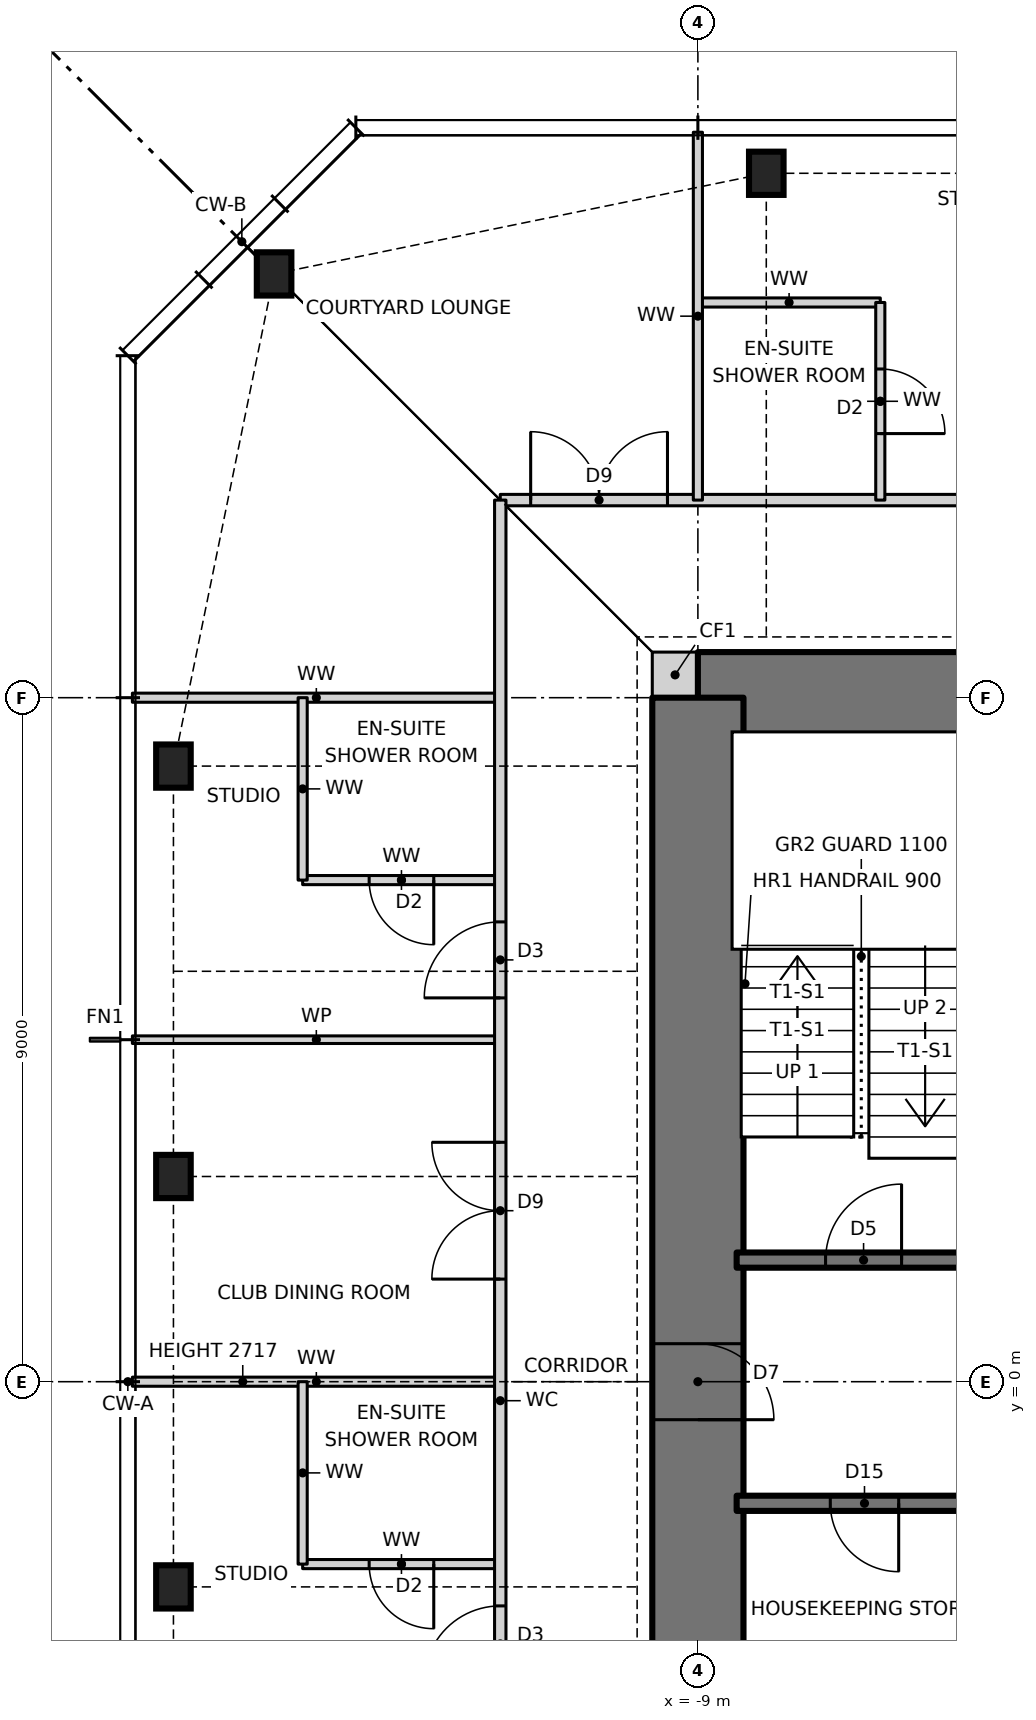
"""IFC4 building model, lengths in metres.
Left out: names, types, materials, properties, quantities, classifications, styles, units other than length and angle.
Written with IfcOpenShell. Run it as: python <this file> out.ifc"""

import sys

from ifc_helpers import new_model, si_unit, direction, frame, frame_2d, origin, origin_2d, place, context, subcontext, project, spatial, rectangle, i_section, extrude, element, fill, save


model = new_model("IFC4")
c1 = context("Model", 3, precision=1e-05, world=origin(), true_north=direction((0.0, 1.0)))
c2 = subcontext(c1, "Body", "Model", "MODEL_VIEW")
j1 = project(units=[si_unit("LENGTHUNIT", "METRE"), si_unit("PLANEANGLEUNIT", "RADIAN")], contexts=[c1])
p1 = place(None, origin())
s1 = spatial("IfcSite", under=j1, at=p1, CompositionType="ELEMENT")
p2 = place(p1, origin())
s2 = spatial("IfcBuilding", under=s1, at=p2, CompositionType="ELEMENT")
p3 = place(p2, frame((0.0, 0.0, 264.0)))
s3 = spatial("IfcBuildingStorey", under=s2, at=p3, CompositionType="ELEMENT", Elevation=264.0)
for number, where, z_axis, x_axis in (
    (1, (-8.1, 15.9, 0.0), (0.0, 0.0, 1.0), (1.0, 0.0, 0.0)),
    (2, (-14.576, 14.576, 0.0), (0.0, 0.0, 1.0), (1.0, 0.0, 0.0)),
    (3, (-15.9, 8.1, 0.0), (0.0, 0.0, 1.0), (1.0, 0.0, 0.0)),
    (4, (-15.9, 2.7, 0.0), (0.0, 0.0, 1.0), (1.0, 0.0, 0.0)),
    (5, (-15.9, -2.7, 0.0), (0.0, 0.0, 1.0), (1.0, 0.0, 0.0)),
):
    element("IfcColumn", number, at=place(p3, frame(where, z_axis=z_axis, x_axis=x_axis)), inside=s3, PredefinedType="COLUMN", context=c2, shape_type="SweptSolid", body=[
        extrude(i_section(OverallWidth=0.455, OverallDepth=0.569, WebThickness=0.078, FlangeThickness=0.125, at=origin_2d()), origin(), (0.0, 0.0, 1.0), 3.5),
    ])
p4 = place(p3, frame((-9.6, 9.3, 0.0), z_axis=(0.0, 0.0, 1.0), x_axis=(1.0, 0.0, 0.0)))
e6 = element("IfcWall", 6, at=p4, inside=s3, PredefinedType="SOLIDWALL", context=c2, shape_type="SweptSolid", body=[
    extrude(rectangle(XDim=0.6, YDim=0.6, at=frame_2d((0.3, 0.0))), origin(), (0.0, 0.0, 1.0), 3.5),
])
p5 = place(p3, frame((9.0, 9.0, 0.0), z_axis=(0.0, 0.0, 1.0), x_axis=(-1.0, 0.0, 0.0)))
e7 = element("IfcWall", 7, at=p5, inside=s3, PredefinedType="SHEAR", context=c2, shape_type="SweptSolid", body=[
    extrude(rectangle(XDim=18.0, YDim=1.2, at=frame_2d((9.0, 0.0))), origin(), (0.0, 0.0, 1.0), 3.5),
])
p6 = place(p5, frame((11.125, 0.0, 0.0)))
e8 = element("IfcOpeningElement", 8, at=p6, cuts=e7, PredefinedType="OPENING", context=c2, shape_type="SweptSolid", body=[
    extrude(rectangle(XDim=0.9, YDim=2.1, at=frame_2d((0.45, 1.05))), frame((0.0, 0.61, 0.0), z_axis=(0.0, -1.0, 0.0), x_axis=(1.0, 0.0, 0.0)), (0.0, 0.0, 1.0), 1.22),
])
p7 = place(p5, frame((4.275, 0.0, 0.0)))
e9 = element("IfcOpeningElement", 9, at=p7, cuts=e7, PredefinedType="OPENING", context=c2, shape_type="SweptSolid", body=[
    extrude(rectangle(XDim=0.9, YDim=2.1, at=frame_2d((0.45, 1.05))), frame((0.0, 0.61, 0.0), z_axis=(0.0, -1.0, 0.0), x_axis=(1.0, 0.0, 0.0)), (0.0, 0.0, 1.0), 1.22),
])
p8 = place(p3, frame((-9.0, 9.0, 0.0), z_axis=(0.0, 0.0, 1.0), x_axis=(0.0, -1.0, 0.0)))
e10 = element("IfcWall", 10, at=p8, inside=s3, PredefinedType="SHEAR", context=c2, shape_type="SweptSolid", body=[
    extrude(rectangle(XDim=18.0, YDim=1.2, at=frame_2d((9.0, 0.0))), origin(), (0.0, 0.0, 1.0), 3.5),
])
p9 = place(p8, frame((8.5, 0.0, 0.0)))
e11 = element("IfcOpeningElement", 11, at=p9, cuts=e10, PredefinedType="OPENING", context=c2, shape_type="SweptSolid", body=[
    extrude(rectangle(XDim=1.0, YDim=2.1, at=frame_2d((0.5, 1.05))), frame((0.0, 0.61, 0.0), z_axis=(0.0, -1.0, 0.0), x_axis=(1.0, 0.0, 0.0)), (0.0, 0.0, 1.0), 1.22),
])
p10 = place(p3, frame((-14.2, -2.4, 0.0), z_axis=(0.0, 0.0, 1.0), x_axis=(1.0, 0.0, 0.0)))
e12 = element("IfcWall", 12, at=p10, inside=s3, PredefinedType="PARTITIONING", context=c2, shape_type="SweptSolid", body=[
    extrude(rectangle(XDim=2.6, YDim=0.12, at=frame_2d((1.3, 0.0))), origin(), (0.0, 0.0, 1.0), 3.25),
])
p11 = place(p10, frame((0.875, 0.0, 0.0)))
e13 = element("IfcOpeningElement", 13, at=p11, cuts=e12, PredefinedType="OPENING", context=c2, shape_type="SweptSolid", body=[
    extrude(rectangle(XDim=0.85, YDim=2.1, at=frame_2d((0.425, 1.05))), frame((0.0, 0.07, 0.0), z_axis=(0.0, -1.0, 0.0), x_axis=(1.0, 0.0, 0.0)), (0.0, 0.0, 1.0), 0.14),
])
p12 = place(p3, frame((-8.49, -1.6, 0.0), z_axis=(0.0, 0.0, 1.0), x_axis=(1.0, 0.0, 0.0)))
e14 = element("IfcWall", 14, at=p12, inside=s3, PredefinedType="SOLIDWALL", context=c2, shape_type="SweptSolid", body=[
    extrude(rectangle(XDim=16.98, YDim=0.2, at=frame_2d((8.49, 0.0))), origin(), (0.0, 0.0, 1.0), 3.5),
])
p13 = place(p12, frame((14.81, 0.0, 0.0)))
e15 = element("IfcOpeningElement", 15, at=p13, cuts=e14, PredefinedType="OPENING", context=c2, shape_type="SweptSolid", body=[
    extrude(rectangle(XDim=1.0, YDim=2.1, at=frame_2d((0.5, 1.05))), frame((0.0, 0.11, 0.0), z_axis=(0.0, -1.0, 0.0), x_axis=(1.0, 0.0, 0.0)), (0.0, 0.0, 1.0), 0.22),
])
p14 = place(p12, frame((1.232, 0.0, 0.0)))
e16 = element("IfcOpeningElement", 16, at=p14, cuts=e14, PredefinedType="OPENING", context=c2, shape_type="SweptSolid", body=[
    extrude(rectangle(XDim=0.9, YDim=2.1, at=frame_2d((0.45, 1.05))), frame((0.0, 0.11, 0.0), z_axis=(0.0, -1.0, 0.0), x_axis=(1.0, 0.0, 0.0)), (0.0, 0.0, 1.0), 0.22),
])
p15 = place(p12, frame((4.627, 0.0, 0.0)))
e17 = element("IfcOpeningElement", 17, at=p15, cuts=e14, PredefinedType="OPENING", context=c2, shape_type="SweptSolid", body=[
    extrude(rectangle(XDim=0.9, YDim=2.1, at=frame_2d((0.45, 1.05))), frame((0.0, 0.11, 0.0), z_axis=(0.0, -1.0, 0.0), x_axis=(1.0, 0.0, 0.0)), (0.0, 0.0, 1.0), 0.22),
])
p16 = place(p12, frame((8.052, 0.0, 0.0)))
e18 = element("IfcOpeningElement", 18, at=p16, cuts=e14, PredefinedType="OPENING", context=c2, shape_type="SweptSolid", body=[
    extrude(rectangle(XDim=0.9, YDim=2.1, at=frame_2d((0.45, 1.05))), frame((0.0, 0.11, 0.0), z_axis=(0.0, -1.0, 0.0), x_axis=(1.0, 0.0, 0.0)), (0.0, 0.0, 1.0), 0.22),
])
p17 = place(p12, frame((11.478, 0.0, 0.0)))
e19 = element("IfcOpeningElement", 19, at=p17, cuts=e14, PredefinedType="OPENING", context=c2, shape_type="SweptSolid", body=[
    extrude(rectangle(XDim=0.9, YDim=2.1, at=frame_2d((0.45, 1.05))), frame((0.0, 0.11, 0.0), z_axis=(0.0, -1.0, 0.0), x_axis=(1.0, 0.0, 0.0)), (0.0, 0.0, 1.0), 0.22),
])
p18 = place(p3, frame((-16.44, 0.0, 0.0), z_axis=(0.0, 0.0, 1.0), x_axis=(1.0, 0.0, 0.0)))
e20 = element("IfcWall", 20, at=p18, inside=s3, PredefinedType="PARTITIONING", context=c2, shape_type="SweptSolid", body=[
    extrude(rectangle(XDim=4.84, YDim=0.12, at=frame_2d((2.42, 0.0))), origin(), (0.0, 0.0, 1.0), 2.717),
])
p19 = place(p3, frame((-8.49, 1.6, 0.0), z_axis=(0.0, 0.0, 1.0), x_axis=(1.0, 0.0, 0.0)))
e21 = element("IfcWall", 21, at=p19, inside=s3, PredefinedType="SOLIDWALL", context=c2, shape_type="SweptSolid", body=[
    extrude(rectangle(XDim=16.98, YDim=0.2, at=frame_2d((8.49, 0.0))), origin(), (0.0, 0.0, 1.0), 3.5),
])
p20 = place(p19, frame((1.17, 0.0, 0.0)))
e22 = element("IfcOpeningElement", 22, at=p20, cuts=e21, PredefinedType="OPENING", context=c2, shape_type="SweptSolid", body=[
    extrude(rectangle(XDim=1.0, YDim=2.1, at=frame_2d((0.5, 1.05))), frame((0.0, 0.11, 0.0), z_axis=(0.0, -1.0, 0.0), x_axis=(1.0, 0.0, 0.0)), (0.0, 0.0, 1.0), 0.22),
])
p21 = place(p19, frame((4.606, 0.0, 0.0)))
e23 = element("IfcOpeningElement", 23, at=p21, cuts=e21, PredefinedType="OPENING", context=c2, shape_type="SweptSolid", body=[
    extrude(rectangle(XDim=0.9, YDim=2.1, at=frame_2d((0.45, 1.05))), frame((0.0, 0.11, 0.0), z_axis=(0.0, -1.0, 0.0), x_axis=(1.0, 0.0, 0.0)), (0.0, 0.0, 1.0), 0.22),
])
p22 = place(p19, frame((8.04, 0.0, 0.0)))
e24 = element("IfcOpeningElement", 24, at=p22, cuts=e21, PredefinedType="OPENING", context=c2, shape_type="SweptSolid", body=[
    extrude(rectangle(XDim=0.9, YDim=2.1, at=frame_2d((0.45, 1.05))), frame((0.0, 0.11, 0.0), z_axis=(0.0, -1.0, 0.0), x_axis=(1.0, 0.0, 0.0)), (0.0, 0.0, 1.0), 0.22),
])
p23 = place(p19, frame((11.374, 0.0, 0.0)))
e25 = element("IfcOpeningElement", 25, at=p23, cuts=e21, PredefinedType="OPENING", context=c2, shape_type="SweptSolid", body=[
    extrude(rectangle(XDim=1.1, YDim=2.1, at=frame_2d((0.55, 1.05))), frame((0.0, 0.11, 0.0), z_axis=(0.0, -1.0, 0.0), x_axis=(1.0, 0.0, 0.0)), (0.0, 0.0, 1.0), 0.22),
])
p24 = place(p19, frame((14.66, 0.0, 0.0)))
e26 = element("IfcOpeningElement", 26, at=p24, cuts=e21, PredefinedType="OPENING", context=c2, shape_type="SweptSolid", body=[
    extrude(rectangle(XDim=1.3, YDim=2.1, at=frame_2d((0.65, 1.05))), frame((0.0, 0.11, 0.0), z_axis=(0.0, -1.0, 0.0), x_axis=(1.0, 0.0, 0.0)), (0.0, 0.0, 1.0), 0.22),
])
p25 = place(p3, frame((-16.44, 4.5, 0.0), z_axis=(0.0, 0.0, 1.0), x_axis=(1.0, 0.0, 0.0)))
e27 = element("IfcWall", 27, at=p25, inside=s3, PredefinedType="PARTITIONING", context=c2, shape_type="SweptSolid", body=[
    extrude(rectangle(XDim=4.84, YDim=0.1, at=frame_2d((2.42, 0.0))), origin(), (0.0, 0.0, 1.0), 3.25),
])
p26 = place(p3, frame((-14.2, 6.6, 0.0), z_axis=(0.0, 0.0, 1.0), x_axis=(1.0, 0.0, 0.0)))
e28 = element("IfcWall", 28, at=p26, inside=s3, PredefinedType="PARTITIONING", context=c2, shape_type="SweptSolid", body=[
    extrude(rectangle(XDim=2.6, YDim=0.12, at=frame_2d((1.3, 0.0))), origin(), (0.0, 0.0, 1.0), 3.25),
])
p27 = place(p26, frame((0.875, 0.0, 0.0)))
e29 = element("IfcOpeningElement", 29, at=p27, cuts=e28, PredefinedType="OPENING", context=c2, shape_type="SweptSolid", body=[
    extrude(rectangle(XDim=0.85, YDim=2.1, at=frame_2d((0.425, 1.05))), frame((0.0, 0.07, 0.0), z_axis=(0.0, -1.0, 0.0), x_axis=(1.0, 0.0, 0.0)), (0.0, 0.0, 1.0), 0.14),
])
p28 = place(p3, frame((-16.44, 9.0, 0.0), z_axis=(0.0, 0.0, 1.0), x_axis=(1.0, 0.0, 0.0)))
e30 = element("IfcWall", 30, at=p28, inside=s3, PredefinedType="PARTITIONING", context=c2, shape_type="SweptSolid", body=[
    extrude(rectangle(XDim=4.84, YDim=0.12, at=frame_2d((2.42, 0.0))), origin(), (0.0, 0.0, 1.0), 3.25),
])
p29 = place(p3, frame((-11.6, 11.6, 0.0), z_axis=(0.0, 0.0, 1.0), x_axis=(1.0, 0.0, 0.0)))
e31 = element("IfcWall", 31, at=p29, inside=s3, PredefinedType="PARTITIONING", context=c2, shape_type="SweptSolid", body=[
    extrude(rectangle(XDim=23.2, YDim=0.15, at=frame_2d((11.6, 0.0))), origin(), (0.0, 0.0, 1.0), 3.25),
])
p30 = place(p29, frame((15.2, 0.0, 0.0)))
e32 = element("IfcOpeningElement", 32, at=p30, cuts=e31, PredefinedType="OPENING", context=c2, shape_type="SweptSolid", body=[
    extrude(rectangle(XDim=1.8, YDim=2.1, at=frame_2d((0.9, 1.05))), frame((0.0, 0.085, 0.0), z_axis=(0.0, -1.0, 0.0), x_axis=(1.0, 0.0, 0.0)), (0.0, 0.0, 1.0), 0.17),
])
p31 = place(p29, frame((8.85, 0.0, 0.0)))
e33 = element("IfcOpeningElement", 33, at=p31, cuts=e31, PredefinedType="OPENING", context=c2, shape_type="SweptSolid", body=[
    extrude(rectangle(XDim=1.0, YDim=2.1, at=frame_2d((0.5, 1.05))), frame((0.0, 0.085, 0.0), z_axis=(0.0, -1.0, 0.0), x_axis=(1.0, 0.0, 0.0)), (0.0, 0.0, 1.0), 0.17),
])
p32 = place(p29, frame((0.4, 0.0, 0.0)))
e34 = element("IfcOpeningElement", 34, at=p32, cuts=e31, PredefinedType="OPENING", context=c2, shape_type="SweptSolid", body=[
    extrude(rectangle(XDim=1.8, YDim=2.1, at=frame_2d((0.9, 1.05))), frame((0.0, 0.085, 0.0), z_axis=(0.0, -1.0, 0.0), x_axis=(1.0, 0.0, 0.0)), (0.0, 0.0, 1.0), 0.17),
])
p33 = place(p3, frame((-9.0, 14.2, 0.0), z_axis=(0.0, 0.0, 1.0), x_axis=(1.0, 0.0, 0.0)))
e35 = element("IfcWall", 35, at=p33, inside=s3, PredefinedType="PARTITIONING", context=c2, shape_type="SweptSolid", body=[
    extrude(rectangle(XDim=2.4, YDim=0.12, at=frame_2d((1.2, 0.0))), origin(), (0.0, 0.0, 1.0), 3.25),
])
p34 = place(p3, frame((-6.6, 11.6, 0.0), z_axis=(0.0, 0.0, 1.0), x_axis=(0.0, 1.0, 0.0)))
e36 = element("IfcWall", 36, at=p34, inside=s3, PredefinedType="PARTITIONING", context=c2, shape_type="SweptSolid", body=[
    extrude(rectangle(XDim=2.6, YDim=0.12, at=frame_2d((1.3, 0.0))), origin(), (0.0, 0.0, 1.0), 3.25),
])
p35 = place(p34, frame((0.875, 0.0, 0.0)))
e37 = element("IfcOpeningElement", 37, at=p35, cuts=e36, PredefinedType="OPENING", context=c2, shape_type="SweptSolid", body=[
    extrude(rectangle(XDim=0.85, YDim=2.1, at=frame_2d((0.425, 1.05))), frame((0.0, 0.07, 0.0), z_axis=(0.0, -1.0, 0.0), x_axis=(1.0, 0.0, 0.0)), (0.0, 0.0, 1.0), 0.14),
])
p36 = place(p3, frame((-9.0, 11.6, 0.0), z_axis=(0.0, 0.0, 1.0), x_axis=(0.0, 1.0, 0.0)))
e38 = element("IfcWall", 38, at=p36, inside=s3, PredefinedType="PARTITIONING", context=c2, shape_type="SweptSolid", body=[
    extrude(rectangle(XDim=4.84, YDim=0.12, at=frame_2d((2.42, 0.0))), origin(), (0.0, 0.0, 1.0), 3.25),
])
p37 = place(p3, frame((-11.6, -12.1, 0.0), z_axis=(0.0, 0.0, 1.0), x_axis=(0.0, 1.0, 0.0)))
e39 = element("IfcWall", 39, at=p37, inside=s3, PredefinedType="PARTITIONING", context=c2, shape_type="SweptSolid", body=[
    extrude(rectangle(XDim=23.7, YDim=0.15, at=frame_2d((11.85, 0.0))), origin(), (0.0, 0.0, 1.0), 3.25),
])
p38 = place(p37, frame((17.15, 0.0, 0.0)))
e40 = element("IfcOpeningElement", 40, at=p38, cuts=e39, PredefinedType="OPENING", context=c2, shape_type="SweptSolid", body=[
    extrude(rectangle(XDim=1.0, YDim=2.1, at=frame_2d((0.5, 1.05))), frame((0.0, 0.085, 0.0), z_axis=(0.0, -1.0, 0.0), x_axis=(1.0, 0.0, 0.0)), (0.0, 0.0, 1.0), 0.17),
])
p39 = place(p37, frame((13.45, 0.0, 0.0)))
e41 = element("IfcOpeningElement", 41, at=p39, cuts=e39, PredefinedType="OPENING", context=c2, shape_type="SweptSolid", body=[
    extrude(rectangle(XDim=1.8, YDim=2.1, at=frame_2d((0.9, 1.05))), frame((0.0, 0.085, 0.0), z_axis=(0.0, -1.0, 0.0), x_axis=(1.0, 0.0, 0.0)), (0.0, 0.0, 1.0), 0.17),
])
p40 = place(p37, frame((8.15, 0.0, 0.0)))
e42 = element("IfcOpeningElement", 42, at=p40, cuts=e39, PredefinedType="OPENING", context=c2, shape_type="SweptSolid", body=[
    extrude(rectangle(XDim=1.0, YDim=2.1, at=frame_2d((0.5, 1.05))), frame((0.0, 0.085, 0.0), z_axis=(0.0, -1.0, 0.0), x_axis=(1.0, 0.0, 0.0)), (0.0, 0.0, 1.0), 0.17),
])
p41 = place(p37, frame((6.05, 0.0, 0.0)))
e43 = element("IfcOpeningElement", 43, at=p41, cuts=e39, PredefinedType="OPENING", context=c2, shape_type="SweptSolid", body=[
    extrude(rectangle(XDim=1.0, YDim=2.1, at=frame_2d((0.5, 1.05))), frame((0.0, 0.085, 0.0), z_axis=(0.0, -1.0, 0.0), x_axis=(1.0, 0.0, 0.0)), (0.0, 0.0, 1.0), 0.17),
])
p42 = place(p37, frame((0.65, 0.0, 0.0)))
e44 = element("IfcOpeningElement", 44, at=p42, cuts=e39, PredefinedType="OPENING", context=c2, shape_type="SweptSolid", body=[
    extrude(rectangle(XDim=1.8, YDim=2.1, at=frame_2d((0.9, 1.05))), frame((0.0, 0.085, 0.0), z_axis=(0.0, -1.0, 0.0), x_axis=(1.0, 0.0, 0.0)), (0.0, 0.0, 1.0), 0.17),
])
for number, where, z_axis, x_axis in (
    (45, (-14.2, -2.4, 0.0), (0.0, 0.0, 1.0), (0.0, 1.0, 0.0)),
    (46, (-14.2, 6.6, 0.0), (0.0, 0.0, 1.0), (0.0, 1.0, 0.0)),
):
    element("IfcWall", number, at=place(p3, frame(where, z_axis=z_axis, x_axis=x_axis)), inside=s3, PredefinedType="PARTITIONING", context=c2, shape_type="SweptSolid", body=[
        extrude(rectangle(XDim=2.4, YDim=0.12, at=frame_2d((1.2, 0.0))), origin(), (0.0, 0.0, 1.0), 3.25),
    ])
p43 = place(p20, origin())
e47 = element("IfcDoor", 47, at=p43, inside=s3, OperationType="SINGLE_SWING_RIGHT", PredefinedType="DOOR", context=c2, shape_type="SweptSolid", body=[
    extrude(rectangle(XDim=1.0, YDim=2.1, at=frame_2d((0.5, 1.05))), frame((0.0, 0.025, 0.0), z_axis=(0.0, -1.0, 0.0), x_axis=(1.0, 0.0, 0.0)), (0.0, 0.0, 1.0), 0.05),
])
fill(e22, e47)
p44 = place(p14, frame((0.9, 0.0, 0.0), z_axis=(0.0, 0.0, 1.0), x_axis=(-1.0, 0.0, 0.0)))
e48 = element("IfcDoor", 48, at=p44, inside=s3, OperationType="SINGLE_SWING_LEFT", PredefinedType="DOOR", context=c2, shape_type="SweptSolid", body=[
    extrude(rectangle(XDim=0.9, YDim=2.1, at=frame_2d((0.45, 1.05))), frame((0.0, 0.025, 0.0), z_axis=(0.0, -1.0, 0.0), x_axis=(1.0, 0.0, 0.0)), (0.0, 0.0, 1.0), 0.05),
])
fill(e16, e48)
p45 = place(p35, frame((0.85, 0.0, 0.0), z_axis=(0.0, 0.0, 1.0), x_axis=(-1.0, 0.0, 0.0)))
e49 = element("IfcDoor", 49, at=p45, inside=s3, OperationType="SINGLE_SWING_RIGHT", PredefinedType="DOOR", context=c2, shape_type="SweptSolid", body=[
    extrude(rectangle(XDim=0.85, YDim=2.1, at=frame_2d((0.425, 1.05))), frame((0.0, 0.025, 0.0), z_axis=(0.0, -1.0, 0.0), x_axis=(1.0, 0.0, 0.0)), (0.0, 0.0, 1.0), 0.05),
])
fill(e37, e49)
p46 = place(p38, origin())
e50 = element("IfcDoor", 50, at=p46, inside=s3, OperationType="SINGLE_SWING_LEFT", PredefinedType="DOOR", context=c2, shape_type="SweptSolid", body=[
    extrude(rectangle(XDim=1.0, YDim=2.1, at=frame_2d((0.5, 1.05))), frame((0.0, 0.025, 0.0), z_axis=(0.0, -1.0, 0.0), x_axis=(1.0, 0.0, 0.0)), (0.0, 0.0, 1.0), 0.05),
])
fill(e40, e50)
p47 = place(p27, frame((0.85, 0.0, 0.0), z_axis=(0.0, 0.0, 1.0), x_axis=(-1.0, 0.0, 0.0)))
e51 = element("IfcDoor", 51, at=p47, inside=s3, OperationType="SINGLE_SWING_LEFT", PredefinedType="DOOR", context=c2, shape_type="SweptSolid", body=[
    extrude(rectangle(XDim=0.85, YDim=2.1, at=frame_2d((0.425, 1.05))), frame((0.0, 0.025, 0.0), z_axis=(0.0, -1.0, 0.0), x_axis=(1.0, 0.0, 0.0)), (0.0, 0.0, 1.0), 0.05),
])
fill(e29, e51)
p48 = place(p39, origin())
e52 = element("IfcDoor", 52, at=p48, inside=s3, OperationType="DOUBLE_DOOR_SINGLE_SWING", PredefinedType="DOOR", context=c2, shape_type="SweptSolid", body=[
    extrude(rectangle(XDim=1.8, YDim=2.1, at=frame_2d((0.9, 1.05))), frame((0.0, 0.025, 0.0), z_axis=(0.0, -1.0, 0.0), x_axis=(1.0, 0.0, 0.0)), (0.0, 0.0, 1.0), 0.05),
])
fill(e41, e52)
p49 = place(p40, origin())
e53 = element("IfcDoor", 53, at=p49, inside=s3, OperationType="SINGLE_SWING_LEFT", PredefinedType="DOOR", context=c2, shape_type="SweptSolid", body=[
    extrude(rectangle(XDim=1.0, YDim=2.1, at=frame_2d((0.5, 1.05))), frame((0.0, 0.025, 0.0), z_axis=(0.0, -1.0, 0.0), x_axis=(1.0, 0.0, 0.0)), (0.0, 0.0, 1.0), 0.05),
])
fill(e42, e53)
p50 = place(p11, frame((0.85, 0.0, 0.0), z_axis=(0.0, 0.0, 1.0), x_axis=(-1.0, 0.0, 0.0)))
e54 = element("IfcDoor", 54, at=p50, inside=s3, OperationType="SINGLE_SWING_LEFT", PredefinedType="DOOR", context=c2, shape_type="SweptSolid", body=[
    extrude(rectangle(XDim=0.85, YDim=2.1, at=frame_2d((0.425, 1.05))), frame((0.0, 0.025, 0.0), z_axis=(0.0, -1.0, 0.0), x_axis=(1.0, 0.0, 0.0)), (0.0, 0.0, 1.0), 0.05),
])
fill(e13, e54)
p51 = place(p32, origin())
e55 = element("IfcDoor", 55, at=p51, inside=s3, OperationType="DOUBLE_DOOR_SINGLE_SWING", PredefinedType="DOOR", context=c2, shape_type="SweptSolid", body=[
    extrude(rectangle(XDim=1.8, YDim=2.1, at=frame_2d((0.9, 1.05))), frame((0.0, 0.025, 0.0), z_axis=(0.0, -1.0, 0.0), x_axis=(1.0, 0.0, 0.0)), (0.0, 0.0, 1.0), 0.05),
])
fill(e34, e55)
p52 = place(p9, origin())
e56 = element("IfcDoor", 56, at=p52, inside=s3, OperationType="SINGLE_SWING_RIGHT", PredefinedType="DOOR", context=c2, shape_type="SweptSolid", body=[
    extrude(rectangle(XDim=1.0, YDim=2.1, at=frame_2d((0.5, 1.05))), frame((0.0, 0.025, 0.0), z_axis=(0.0, -1.0, 0.0), x_axis=(1.0, 0.0, 0.0)), (0.0, 0.0, 1.0), 0.05),
])
fill(e11, e56)
save(model, sys.argv[1])
